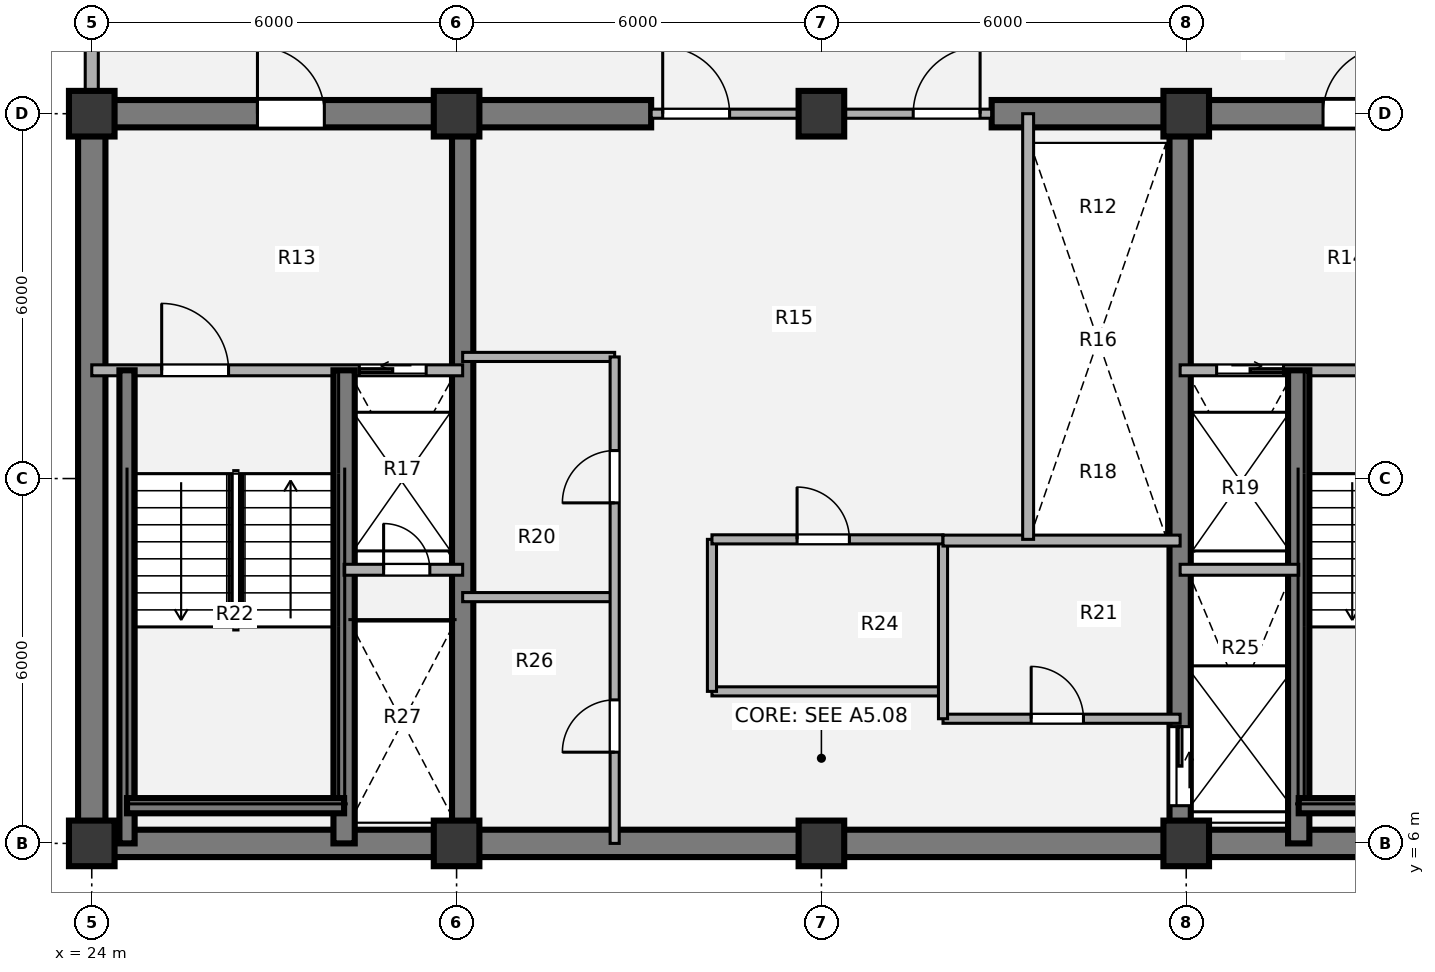
"""IFC4 building model, lengths in metres.
Left out: names, types, materials, properties, quantities, classifications, styles, units other than length and angle.
Written with IfcOpenShell. Run it as: python <this file> out.ifc"""

import sys

from ifc_helpers import new_model, si_unit, direction, frame, frame_2d, origin, origin_2d, place, context, subcontext, project, spatial, rectangle, extrude, source, transform, mapped, element, fill, save


model = new_model("IFC4")
c1 = context("Model", 3, precision=1e-05, world=origin(), true_north=direction((0.0, 1.0)))
c2 = subcontext(c1, "Body", "Model", "MODEL_VIEW")
j1 = project(units=[si_unit("LENGTHUNIT", "METRE"), si_unit("PLANEANGLEUNIT", "RADIAN")], contexts=[c1])
p1 = place(None, origin())
s1 = spatial("IfcSite", under=j1, at=p1, CompositionType="ELEMENT")
p2 = place(p1, origin())
s2 = spatial("IfcBuilding", under=s1, at=p2, CompositionType="ELEMENT")
p3 = place(p2, frame((0.0, 0.0, 186.66)))
s3 = spatial("IfcBuildingStorey", under=s2, at=p3, CompositionType="ELEMENT", Elevation=186.66)
m1 = source(origin(), c2, "Body", "SweptSolid", [
    extrude(rectangle(XDim=0.75, YDim=0.75, at=origin_2d()), origin(), (0.0, 0.0, 1.0), 3.78),
])
for number, where, z_axis, x_axis in (
    (1, (24.0, 6.0, 0.0), (0.0, 0.0, 1.0), (1.0, 0.0, 0.0)),
    (2, (30.0, 6.0, 0.0), (0.0, 0.0, 1.0), (1.0, 0.0, 0.0)),
    (3, (36.0, 6.0, 0.0), (0.0, 0.0, 1.0), (1.0, 0.0, 0.0)),
    (4, (42.0, 6.0, 0.0), (0.0, 0.0, 1.0), (1.0, 0.0, 0.0)),
    (5, (24.0, 18.0, 0.0), (0.0, 0.0, 1.0), (1.0, 0.0, 0.0)),
    (6, (30.0, 18.0, 0.0), (0.0, 0.0, 1.0), (1.0, 0.0, 0.0)),
    (7, (36.0, 18.0, 0.0), (0.0, 0.0, 1.0), (1.0, 0.0, 0.0)),
    (8, (42.0, 18.0, 0.0), (0.0, 0.0, 1.0), (1.0, 0.0, 0.0)),
):
    element("IfcColumn", number, at=place(p3, frame(where, z_axis=z_axis, x_axis=x_axis)), inside=s3, PredefinedType="COLUMN", context=c2, shape_type="MappedRepresentation", body=[
        mapped(m1, transform((0.0, 0.0, 0.0), x_axis=(1.0, 0.0, 0.0), y_axis=(0.0, 1.0, 0.0), z_axis=(0.0, 0.0, 1.0), scale=1.0)),
    ])
p4 = place(p3, frame((48.225, 6.0, 0.0), z_axis=(0.0, 0.0, 1.0), x_axis=(-1.0, 0.0, 0.0)))
e9 = element("IfcWall", 9, at=p4, inside=s3, PredefinedType="SHEAR", context=c2, shape_type="SweptSolid", body=[
    extrude(rectangle(XDim=24.45, YDim=0.45, at=frame_2d((12.225, 0.0))), origin(), (0.0, 0.0, 1.0), 3.78),
])
p5 = place(p3, frame((24.0, 6.0, 0.0), z_axis=(0.0, 0.0, 1.0), x_axis=(0.0, 1.0, 0.0)))
e10 = element("IfcWall", 10, at=p5, inside=s3, PredefinedType="SHEAR", context=c2, shape_type="SweptSolid", body=[
    extrude(rectangle(XDim=12.0, YDim=0.45, at=frame_2d((6.0, 0.0))), origin(), (0.0, 0.0, 1.0), 3.78),
])
p6 = place(p3, frame((23.775, 18.0, 0.0), z_axis=(0.0, 0.0, 1.0), x_axis=(1.0, 0.0, 0.0)))
e11 = element("IfcWall", 11, at=p6, inside=s3, PredefinedType="SHEAR", context=c2, shape_type="SweptSolid", body=[
    extrude(rectangle(XDim=9.425, YDim=0.45, at=frame_2d((4.712, 0.0))), origin(), (0.0, 0.0, 1.0), 3.78),
])
p7 = place(p6, frame((2.95, 0.0, 0.0)))
e12 = element("IfcOpeningElement", 12, at=p7, cuts=e11, PredefinedType="OPENING", context=c2, shape_type="SweptSolid", body=[
    extrude(rectangle(XDim=1.1, YDim=2.1, at=origin_2d()), frame((0.55, 0.235, 1.05), z_axis=(0.0, -1.0, 0.0), x_axis=(1.0, 0.0, 0.0)), (0.0, 0.0, 1.0), 0.47),
])
p8 = place(p3, frame((38.8, 18.0, 0.0), z_axis=(0.0, 0.0, 1.0), x_axis=(1.0, 0.0, 0.0)))
e13 = element("IfcWall", 13, at=p8, inside=s3, PredefinedType="SHEAR", context=c2, shape_type="SweptSolid", body=[
    extrude(rectangle(XDim=9.425, YDim=0.45, at=frame_2d((4.712, 0.0))), origin(), (0.0, 0.0, 1.0), 3.78),
])
p9 = place(p8, frame((5.45, 0.0, 0.0)))
e14 = element("IfcOpeningElement", 14, at=p9, cuts=e13, PredefinedType="OPENING", context=c2, shape_type="SweptSolid", body=[
    extrude(rectangle(XDim=1.1, YDim=2.1, at=origin_2d()), frame((0.55, 0.235, 1.05), z_axis=(0.0, -1.0, 0.0), x_axis=(1.0, 0.0, 0.0)), (0.0, 0.0, 1.0), 0.47),
])
p10 = place(p3, frame((30.1, 6.0, 0.0), z_axis=(0.0, 0.0, 1.0), x_axis=(0.0, 1.0, 0.0)))
e15 = element("IfcWall", 15, at=p10, inside=s3, PredefinedType="SHEAR", context=c2, shape_type="SweptSolid", body=[
    extrude(rectangle(XDim=12.0, YDim=0.35, at=frame_2d((6.0, 0.0))), origin(), (0.0, 0.0, 1.0), 3.78),
])
p11 = place(p3, frame((41.9, 18.0, 0.0), z_axis=(0.0, 0.0, 1.0), x_axis=(0.0, -1.0, 0.0)))
e16 = element("IfcWall", 16, at=p11, inside=s3, PredefinedType="SHEAR", context=c2, shape_type="SweptSolid", body=[
    extrude(rectangle(XDim=12.0, YDim=0.35, at=frame_2d((6.0, 0.0))), origin(), (0.0, 0.0, 1.0), 3.78),
])
p12 = place(p11, frame((10.08, 0.0, 0.0)))
e17 = element("IfcOpeningElement", 17, at=p12, cuts=e16, PredefinedType="OPENING", context=c2, shape_type="SweptSolid", body=[
    extrude(rectangle(XDim=1.3, YDim=2.1, at=origin_2d()), frame((0.65, 0.185, 1.05), z_axis=(0.0, -1.0, 0.0), x_axis=(1.0, 0.0, 0.0)), (0.0, 0.0, 1.0), 0.37),
])
p13 = place(p3, frame((24.0, 18.355, 0.0), z_axis=(0.0, 0.0, 1.0), x_axis=(0.0, 1.0, 0.0)))
e18 = element("IfcWall", 18, at=p13, inside=s3, PredefinedType="SOLIDWALL", context=c2, shape_type="SweptSolid", body=[
    extrude(rectangle(XDim=2.695, YDim=0.215, at=frame_2d((1.348, 0.0))), origin(), (0.0, 0.0, 1.0), 2.718),
])
p14 = place(p3, frame((30.1, 14.0, 0.0), z_axis=(0.0, 0.0, 1.0), x_axis=(1.0, 0.0, 0.0)))
e19 = element("IfcWall", 19, at=p14, inside=s3, PredefinedType="PARTITIONING", context=c2, shape_type="SweptSolid", body=[
    extrude(rectangle(XDim=2.5, YDim=0.15, at=frame_2d((1.25, 0.0))), origin(), (0.0, 0.0, 1.0), 3.5),
])
p15 = place(p3, frame((34.2, 8.5, 0.0), z_axis=(0.0, 0.0, 1.0), x_axis=(1.0, 0.0, 0.0)))
e20 = element("IfcWall", 20, at=p15, inside=s3, PredefinedType="PARTITIONING", context=c2, shape_type="SweptSolid", body=[
    extrude(rectangle(XDim=3.8, YDim=0.15, at=frame_2d((1.9, 0.0))), origin(), (0.0, 0.0, 1.0), 3.5),
])
p16 = place(p3, frame((38.0, 8.05, 0.0), z_axis=(0.0, 0.0, 1.0), x_axis=(1.0, 0.0, 0.0)))
e21 = element("IfcWall", 21, at=p16, inside=s3, PredefinedType="PARTITIONING", context=c2, shape_type="SweptSolid", body=[
    extrude(rectangle(XDim=3.9, YDim=0.15, at=frame_2d((1.95, 0.0))), origin(), (0.0, 0.0, 1.0), 3.5),
])
p17 = place(p16, frame((1.45, 0.0, 0.0)))
e22 = element("IfcOpeningElement", 22, at=p17, cuts=e21, PredefinedType="OPENING", context=c2, shape_type="SweptSolid", body=[
    extrude(rectangle(XDim=0.86, YDim=2.1, at=origin_2d()), frame((0.43, 0.085, 1.05), z_axis=(0.0, -1.0, 0.0), x_axis=(1.0, 0.0, 0.0)), (0.0, 0.0, 1.0), 0.17),
])
p18 = place(p3, frame((34.2, 8.5, 0.0), z_axis=(0.0, 0.0, 1.0), x_axis=(0.0, 1.0, 0.0)))
e23 = element("IfcWall", 23, at=p18, inside=s3, PredefinedType="PARTITIONING", context=c2, shape_type="SweptSolid", body=[
    extrude(rectangle(XDim=2.5, YDim=0.15, at=frame_2d((1.25, 0.0))), origin(), (0.0, 0.0, 1.0), 3.5),
])
p19 = place(p3, frame((38.0, 8.05, 0.0), z_axis=(0.0, 0.0, 1.0), x_axis=(0.0, 1.0, 0.0)))
e24 = element("IfcWall", 24, at=p19, inside=s3, PredefinedType="PARTITIONING", context=c2, shape_type="SweptSolid", body=[
    extrude(rectangle(XDim=2.95, YDim=0.15, at=frame_2d((1.475, 0.0))), origin(), (0.0, 0.0, 1.0), 3.5),
])
p20 = place(p3, frame((34.2, 11.0, 0.0), z_axis=(0.0, 0.0, 1.0), x_axis=(1.0, 0.0, 0.0)))
e25 = element("IfcWall", 25, at=p20, inside=s3, PredefinedType="PARTITIONING", context=c2, shape_type="SweptSolid", body=[
    extrude(rectangle(XDim=3.8, YDim=0.15, at=frame_2d((1.9, 0.0))), origin(), (0.0, 0.0, 1.0), 3.5),
])
p21 = place(p20, frame((1.4, 0.0, 0.0)))
e26 = element("IfcOpeningElement", 26, at=p21, cuts=e25, PredefinedType="OPENING", context=c2, shape_type="SweptSolid", body=[
    extrude(rectangle(XDim=0.86, YDim=2.1, at=origin_2d()), frame((0.43, 0.085, 1.05), z_axis=(0.0, -1.0, 0.0), x_axis=(1.0, 0.0, 0.0)), (0.0, 0.0, 1.0), 0.17),
])
p22 = place(p3, frame((38.0, 10.98, 0.0), z_axis=(0.0, 0.0, 1.0), x_axis=(1.0, 0.0, 0.0)))
e27 = element("IfcWall", 27, at=p22, inside=s3, PredefinedType="PARTITIONING", context=c2, shape_type="SweptSolid", body=[
    extrude(rectangle(XDim=3.9, YDim=0.18, at=frame_2d((1.95, 0.0))), origin(), (0.0, 0.0, 1.0), 3.5),
])
p23 = place(p3, frame((39.4, 11.0, 0.0), z_axis=(0.0, 0.0, 1.0), x_axis=(0.0, 1.0, 0.0)))
e28 = element("IfcWall", 28, at=p23, inside=s3, PredefinedType="PARTITIONING", context=c2, shape_type="SweptSolid", body=[
    extrude(rectangle(XDim=7.0, YDim=0.18, at=frame_2d((3.5, 0.0))), origin(), (0.0, 0.0, 1.0), 3.5),
])
p24 = place(p3, frame((30.1, 10.05, 0.0), z_axis=(0.0, 0.0, 1.0), x_axis=(1.0, 0.0, 0.0)))
e29 = element("IfcWall", 29, at=p24, inside=s3, PredefinedType="PARTITIONING", context=c2, shape_type="SweptSolid", body=[
    extrude(rectangle(XDim=2.5, YDim=0.15, at=frame_2d((1.25, 0.0))), origin(), (0.0, 0.0, 1.0), 3.5),
])
p25 = place(p3, frame((32.6, 6.0, 0.0), z_axis=(0.0, 0.0, 1.0), x_axis=(0.0, 1.0, 0.0)))
e30 = element("IfcWall", 30, at=p25, inside=s3, PredefinedType="PARTITIONING", context=c2, shape_type="SweptSolid", body=[
    extrude(rectangle(XDim=8.0, YDim=0.15, at=frame_2d((4.0, 0.0))), origin(), (0.0, 0.0, 1.0), 3.5),
])
p26 = place(p25, frame((1.5, 0.0, 0.0)))
e31 = element("IfcOpeningElement", 31, at=p26, cuts=e30, PredefinedType="OPENING", context=c2, shape_type="SweptSolid", body=[
    extrude(rectangle(XDim=0.86, YDim=2.1, at=origin_2d()), frame((0.43, 0.085, 1.05), z_axis=(0.0, -1.0, 0.0), x_axis=(1.0, 0.0, 0.0)), (0.0, 0.0, 1.0), 0.17),
])
p27 = place(p25, frame((5.6, 0.0, 0.0)))
e32 = element("IfcOpeningElement", 32, at=p27, cuts=e30, PredefinedType="OPENING", context=c2, shape_type="SweptSolid", body=[
    extrude(rectangle(XDim=0.86, YDim=2.1, at=origin_2d()), frame((0.43, 0.085, 1.05), z_axis=(0.0, -1.0, 0.0), x_axis=(1.0, 0.0, 0.0)), (0.0, 0.0, 1.0), 0.17),
])
p28 = place(p3, frame((33.2, 18.0, 0.0), z_axis=(0.0, 0.0, 1.0), x_axis=(1.0, 0.0, 0.0)))
e33 = element("IfcWall", 33, at=p28, inside=s3, PredefinedType="PARTITIONING", context=c2, shape_type="SweptSolid", body=[
    extrude(rectangle(XDim=5.6, YDim=0.15, at=frame_2d((2.8, 0.0))), origin(), (0.0, 0.0, 1.0), 2.515),
])
p29 = place(p28, frame((0.19, 0.0, 0.0)))
e34 = element("IfcOpeningElement", 34, at=p29, cuts=e33, PredefinedType="OPENING", context=c2, shape_type="SweptSolid", body=[
    extrude(rectangle(XDim=1.1, YDim=2.1, at=origin_2d()), frame((0.55, 0.085, 1.05), z_axis=(0.0, -1.0, 0.0), x_axis=(1.0, 0.0, 0.0)), (0.0, 0.0, 1.0), 0.17),
])
p30 = place(p28, frame((4.31, 0.0, 0.0)))
e35 = element("IfcOpeningElement", 35, at=p30, cuts=e33, PredefinedType="OPENING", context=c2, shape_type="SweptSolid", body=[
    extrude(rectangle(XDim=1.1, YDim=2.1, at=origin_2d()), frame((0.55, 0.085, 1.05), z_axis=(0.0, -1.0, 0.0), x_axis=(1.0, 0.0, 0.0)), (0.0, 0.0, 1.0), 0.17),
])
p31 = place(p3, frame((24.0, 13.78, 0.0), z_axis=(0.0, 0.0, 1.0), x_axis=(1.0, 0.0, 0.0)))
e36 = element("IfcWall", 36, at=p31, inside=s3, PredefinedType="PARTITIONING", context=c2, shape_type="SweptSolid", body=[
    extrude(rectangle(XDim=6.1, YDim=0.18, at=frame_2d((3.05, 0.0))), origin(), (0.0, 0.0, 1.0), 3.5),
])
p32 = place(p31, frame((1.15, 0.0, 0.0)))
e37 = element("IfcOpeningElement", 37, at=p32, cuts=e36, PredefinedType="OPENING", context=c2, shape_type="SweptSolid", body=[
    extrude(rectangle(XDim=1.1, YDim=2.1, at=origin_2d()), frame((0.55, 0.1, 1.05), z_axis=(0.0, -1.0, 0.0), x_axis=(1.0, 0.0, 0.0)), (0.0, 0.0, 1.0), 0.2),
])
p33 = place(p31, frame((4.4, 0.0, 0.0)))
e38 = element("IfcOpeningElement", 38, at=p33, cuts=e36, PredefinedType="OPENING", context=c2, shape_type="SweptSolid", body=[
    extrude(rectangle(XDim=1.1, YDim=2.1, at=origin_2d()), frame((0.55, 0.1, 1.05), z_axis=(0.0, -1.0, 0.0), x_axis=(1.0, 0.0, 0.0)), (0.0, 0.0, 1.0), 0.2),
])
p34 = place(p3, frame((28.15, 6.0, 0.0), z_axis=(0.0, 0.0, 1.0), x_axis=(0.0, 1.0, 0.0)))
e39 = element("IfcWall", 39, at=p34, inside=s3, PredefinedType="SHEAR", context=c2, shape_type="SweptSolid", body=[
    extrude(rectangle(XDim=7.78, YDim=0.35, at=frame_2d((3.89, 0.0))), origin(), (0.0, 0.0, 1.0), 3.85),
])
p35 = place(p3, frame((24.58, 6.0, 0.0), z_axis=(0.0, 0.0, 1.0), x_axis=(0.0, 1.0, 0.0)))
e40 = element("IfcWall", 40, at=p35, inside=s3, PredefinedType="SHEAR", context=c2, shape_type="SweptSolid", body=[
    extrude(rectangle(XDim=7.78, YDim=0.25, at=frame_2d((3.89, 0.0))), origin(), (0.0, 0.0, 1.0), 3.85),
])
p36 = place(p3, frame((24.58, 6.62, 0.0), z_axis=(0.0, 0.0, 1.0), x_axis=(1.0, 0.0, 0.0)))
e41 = element("IfcWall", 41, at=p36, inside=s3, PredefinedType="SHEAR", context=c2, shape_type="SweptSolid", body=[
    extrude(rectangle(XDim=3.57, YDim=0.25, at=frame_2d((1.785, 0.0))), origin(), (0.0, 0.0, 1.0), 3.85),
])
p37 = place(p3, frame((28.15, 10.5, 0.0), z_axis=(0.0, 0.0, 1.0), x_axis=(1.0, 0.0, 0.0)))
e42 = element("IfcWall", 42, at=p37, inside=s3, PredefinedType="PARTITIONING", context=c2, shape_type="SweptSolid", body=[
    extrude(rectangle(XDim=1.95, YDim=0.18, at=frame_2d((0.975, 0.0))), origin(), (0.0, 0.0, 1.0), 3.5),
])
p38 = place(p37, frame((0.65, 0.0, 0.0)))
e43 = element("IfcOpeningElement", 43, at=p38, cuts=e42, PredefinedType="OPENING", context=c2, shape_type="SweptSolid", body=[
    extrude(rectangle(XDim=0.76, YDim=2.05, at=origin_2d()), frame((0.38, 0.1, 1.025), z_axis=(0.0, -1.0, 0.0), x_axis=(1.0, 0.0, 0.0)), (0.0, 0.0, 1.0), 0.2),
])
p39 = place(p3, frame((41.9, 13.78, 0.0), z_axis=(0.0, 0.0, 1.0), x_axis=(1.0, 0.0, 0.0)))
e44 = element("IfcWall", 44, at=p39, inside=s3, PredefinedType="PARTITIONING", context=c2, shape_type="SweptSolid", body=[
    extrude(rectangle(XDim=6.1, YDim=0.18, at=frame_2d((3.05, 0.0))), origin(), (0.0, 0.0, 1.0), 3.5),
])
p40 = place(p39, frame((0.6, 0.0, 0.0)))
e45 = element("IfcOpeningElement", 45, at=p40, cuts=e44, PredefinedType="OPENING", context=c2, shape_type="SweptSolid", body=[
    extrude(rectangle(XDim=1.1, YDim=2.1, at=origin_2d()), frame((0.55, 0.1, 1.05), z_axis=(0.0, -1.0, 0.0), x_axis=(1.0, 0.0, 0.0)), (0.0, 0.0, 1.0), 0.2),
])
p41 = place(p39, frame((3.8, 0.0, 0.0)))
e46 = element("IfcOpeningElement", 46, at=p41, cuts=e44, PredefinedType="OPENING", context=c2, shape_type="SweptSolid", body=[
    extrude(rectangle(XDim=1.1, YDim=2.1, at=origin_2d()), frame((0.55, 0.1, 1.05), z_axis=(0.0, -1.0, 0.0), x_axis=(1.0, 0.0, 0.0)), (0.0, 0.0, 1.0), 0.2),
])
p42 = place(p3, frame((43.85, 6.0, 0.0), z_axis=(0.0, 0.0, 1.0), x_axis=(0.0, 1.0, 0.0)))
e47 = element("IfcWall", 47, at=p42, inside=s3, PredefinedType="SHEAR", context=c2, shape_type="SweptSolid", body=[
    extrude(rectangle(XDim=7.78, YDim=0.35, at=frame_2d((3.89, 0.0))), origin(), (0.0, 0.0, 1.0), 3.85),
])
p43 = place(p3, frame((43.85, 6.62, 0.0), z_axis=(0.0, 0.0, 1.0), x_axis=(1.0, 0.0, 0.0)))
e48 = element("IfcWall", 48, at=p43, inside=s3, PredefinedType="SHEAR", context=c2, shape_type="SweptSolid", body=[
    extrude(rectangle(XDim=3.57, YDim=0.25, at=frame_2d((1.785, 0.0))), origin(), (0.0, 0.0, 1.0), 3.85),
])
p44 = place(p3, frame((41.9, 10.5, 0.0), z_axis=(0.0, 0.0, 1.0), x_axis=(1.0, 0.0, 0.0)))
e49 = element("IfcWall", 49, at=p44, inside=s3, PredefinedType="PARTITIONING", context=c2, shape_type="SweptSolid", body=[
    extrude(rectangle(XDim=1.95, YDim=0.18, at=frame_2d((0.975, 0.0))), origin(), (0.0, 0.0, 1.0), 3.5),
])
m2 = source(origin(), c2, "Body", "SweptSolid", [
    extrude(rectangle(XDim=0.86, YDim=2.1, at=origin_2d()), frame((0.43, 0.025, 1.05), z_axis=(0.0, -1.0, 0.0), x_axis=(1.0, 0.0, 0.0)), (0.0, 0.0, 1.0), 0.05),
])
p45 = place(p17, origin())
e50 = element("IfcDoor", 50, at=p45, inside=s3, OperationType="SINGLE_SWING_LEFT", PredefinedType="DOOR", context=c2, shape_type="MappedRepresentation", body=[
    mapped(m2, transform((0.0, 0.0, 0.0), x_axis=(1.0, 0.0, 0.0), y_axis=(0.0, 1.0, 0.0), z_axis=(0.0, 0.0, 1.0), scale=1.0)),
])
fill(e22, e50)
p46 = place(p21, origin())
e51 = element("IfcDoor", 51, at=p46, inside=s3, OperationType="SINGLE_SWING_LEFT", PredefinedType="DOOR", context=c2, shape_type="MappedRepresentation", body=[
    mapped(m2, transform((0.0, 0.0, 0.0), x_axis=(1.0, 0.0, 0.0), y_axis=(0.0, 1.0, 0.0), z_axis=(0.0, 0.0, 1.0), scale=1.0)),
])
fill(e26, e51)
p47 = place(p26, origin())
e52 = element("IfcDoor", 52, at=p47, inside=s3, OperationType="SINGLE_SWING_LEFT", PredefinedType="DOOR", context=c2, shape_type="MappedRepresentation", body=[
    mapped(m2, transform((0.0, 0.0, 0.0), x_axis=(1.0, 0.0, 0.0), y_axis=(0.0, 1.0, 0.0), z_axis=(0.0, 0.0, 1.0), scale=1.0)),
])
fill(e31, e52)
p48 = place(p27, origin())
e53 = element("IfcDoor", 53, at=p48, inside=s3, OperationType="SINGLE_SWING_LEFT", PredefinedType="DOOR", context=c2, shape_type="MappedRepresentation", body=[
    mapped(m2, transform((0.0, 0.0, 0.0), x_axis=(1.0, 0.0, 0.0), y_axis=(0.0, 1.0, 0.0), z_axis=(0.0, 0.0, 1.0), scale=1.0)),
])
fill(e32, e53)
m3 = source(origin(), c2, "Body", "SweptSolid", [
    extrude(rectangle(XDim=1.1, YDim=2.1, at=origin_2d()), frame((0.55, 0.025, 1.05), z_axis=(0.0, -1.0, 0.0), x_axis=(1.0, 0.0, 0.0)), (0.0, 0.0, 1.0), 0.05),
])
p49 = place(p29, origin())
e54 = element("IfcDoor", 54, at=p49, inside=s3, OperationType="SINGLE_SWING_LEFT", PredefinedType="DOOR", context=c2, shape_type="MappedRepresentation", body=[
    mapped(m3, transform((0.0, 0.0, 0.0), x_axis=(1.0, 0.0, 0.0), y_axis=(0.0, 1.0, 0.0), z_axis=(0.0, 0.0, 1.0), scale=1.0)),
])
fill(e34, e54)
p50 = place(p30, origin())
e55 = element("IfcDoor", 55, at=p50, inside=s3, OperationType="SINGLE_SWING_RIGHT", PredefinedType="DOOR", context=c2, shape_type="MappedRepresentation", body=[
    mapped(m3, transform((0.0, 0.0, 0.0), x_axis=(1.0, 0.0, 0.0), y_axis=(0.0, 1.0, 0.0), z_axis=(0.0, 0.0, 1.0), scale=1.0)),
])
fill(e35, e55)
m4 = source(origin(), c2, "Body", "SweptSolid", [
    extrude(rectangle(XDim=1.1, YDim=2.1, at=origin_2d()), frame((0.55, 0.025, 1.05), z_axis=(0.0, -1.0, 0.0), x_axis=(1.0, 0.0, 0.0)), (0.0, 0.0, 1.0), 0.05),
])
p51 = place(p32, origin())
e56 = element("IfcDoor", 56, at=p51, inside=s3, OperationType="SINGLE_SWING_LEFT", PredefinedType="DOOR", context=c2, shape_type="MappedRepresentation", body=[
    mapped(m4, transform((0.0, 0.0, 0.0), x_axis=(1.0, 0.0, 0.0), y_axis=(0.0, 1.0, 0.0), z_axis=(0.0, 0.0, 1.0), scale=1.0)),
])
fill(e37, e56)
m5 = source(origin(), c2, "Body", "SweptSolid", [
    extrude(rectangle(XDim=1.1, YDim=2.1, at=origin_2d()), frame((0.55, 0.025, 1.05), z_axis=(0.0, -1.0, 0.0), x_axis=(1.0, 0.0, 0.0)), (0.0, 0.0, 1.0), 0.05),
])
p52 = place(p33, origin())
e57 = element("IfcDoor", 57, at=p52, inside=s3, OperationType="SLIDING_TO_LEFT", PredefinedType="DOOR", context=c2, shape_type="MappedRepresentation", body=[
    mapped(m5, transform((0.0, 0.0, 0.0), x_axis=(1.0, 0.0, 0.0), y_axis=(0.0, 1.0, 0.0), z_axis=(0.0, 0.0, 1.0), scale=1.0)),
])
fill(e38, e57)
m6 = source(origin(), c2, "Body", "SweptSolid", [
    extrude(rectangle(XDim=0.76, YDim=2.05, at=origin_2d()), frame((0.38, 0.025, 1.025), z_axis=(0.0, -1.0, 0.0), x_axis=(1.0, 0.0, 0.0)), (0.0, 0.0, 1.0), 0.05),
])
p53 = place(p38, origin())
e58 = element("IfcDoor", 58, at=p53, inside=s3, OperationType="SINGLE_SWING_LEFT", PredefinedType="DOOR", context=c2, shape_type="MappedRepresentation", body=[
    mapped(m6, transform((0.0, 0.0, 0.0), x_axis=(1.0, 0.0, 0.0), y_axis=(0.0, 1.0, 0.0), z_axis=(0.0, 0.0, 1.0), scale=1.0)),
])
fill(e43, e58)
p54 = place(p40, origin())
e59 = element("IfcDoor", 59, at=p54, inside=s3, OperationType="SLIDING_TO_RIGHT", PredefinedType="DOOR", context=c2, shape_type="MappedRepresentation", body=[
    mapped(m5, transform((0.0, 0.0, 0.0), x_axis=(1.0, 0.0, 0.0), y_axis=(0.0, 1.0, 0.0), z_axis=(0.0, 0.0, 1.0), scale=1.0)),
])
fill(e45, e59)
m7 = source(origin(), c2, "Body", "SweptSolid", [
    extrude(rectangle(XDim=1.3, YDim=2.1, at=origin_2d()), frame((0.65, 0.025, 1.05), z_axis=(0.0, -1.0, 0.0), x_axis=(1.0, 0.0, 0.0)), (0.0, 0.0, 1.0), 0.05),
])
p55 = place(p12, origin())
e60 = element("IfcDoor", 60, at=p55, inside=s3, OperationType="SLIDING_TO_LEFT", PredefinedType="DOOR", context=c2, shape_type="MappedRepresentation", body=[
    mapped(m7, transform((0.0, 0.0, 0.0), x_axis=(1.0, 0.0, 0.0), y_axis=(0.0, 1.0, 0.0), z_axis=(0.0, 0.0, 1.0), scale=1.0)),
])
fill(e17, e60)
p56 = place(p7, origin())
e61 = element("IfcDoor", 61, at=p56, inside=s3, OperationType="SINGLE_SWING_LEFT", PredefinedType="DOOR", context=c2, shape_type="MappedRepresentation", body=[
    mapped(m3, transform((0.0, 0.0, 0.0), x_axis=(1.0, 0.0, 0.0), y_axis=(0.0, 1.0, 0.0), z_axis=(0.0, 0.0, 1.0), scale=1.0)),
])
fill(e12, e61)
p57 = place(p9, origin())
e62 = element("IfcDoor", 62, at=p57, inside=s3, OperationType="SINGLE_SWING_RIGHT", PredefinedType="DOOR", context=c2, shape_type="MappedRepresentation", body=[
    mapped(m3, transform((0.0, 0.0, 0.0), x_axis=(1.0, 0.0, 0.0), y_axis=(0.0, 1.0, 0.0), z_axis=(0.0, 0.0, 1.0), scale=1.0)),
])
fill(e14, e62)
save(model, sys.argv[1])
